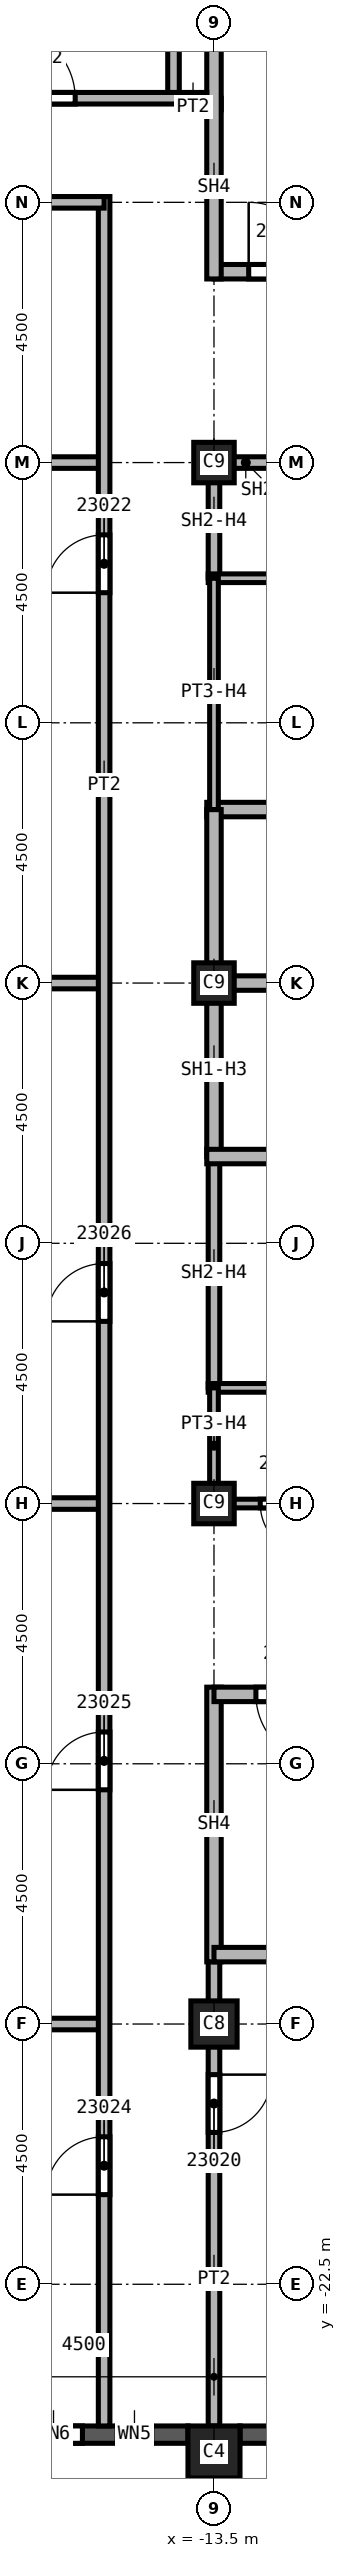
"""IFC4 building model, lengths in metres.
Left out: names, types, materials, properties, quantities, classifications, styles, units other than length and angle.
Written with IfcOpenShell. Run it as: python <this file> out.ifc"""

import sys

from ifc_helpers import new_model, si_unit, direction, frame, frame_2d, origin, origin_2d, place, context, subcontext, project, spatial, rectangle, extrude, element, fill, save


model = new_model("IFC4")
c1 = context("Model", 3, precision=1e-05, world=origin(), true_north=direction((0.0, 1.0)))
c2 = subcontext(c1, "Body", "Model", "MODEL_VIEW")
j1 = project(units=[si_unit("LENGTHUNIT", "METRE"), si_unit("PLANEANGLEUNIT", "RADIAN")], contexts=[c1])
p1 = place(None, origin())
s1 = spatial("IfcSite", under=j1, at=p1, CompositionType="ELEMENT")
p2 = place(p1, origin())
s2 = spatial("IfcBuilding", under=s1, at=p2, CompositionType="ELEMENT")
p3 = place(p2, frame((0.0, 0.0, 326.0)))
s3 = spatial("IfcBuildingStorey", under=s2, at=p3, CompositionType="ELEMENT", Elevation=326.0)
p4 = place(p3, frame((-13.5, -18.0, 0.0), z_axis=(0.0, 0.0, 1.0), x_axis=(1.0, 0.0, 0.0)))
e1 = element("IfcColumn", 1, at=p4, inside=s3, PredefinedType="COLUMN", context=c2, shape_type="SweptSolid", body=[
    extrude(rectangle(XDim=0.8, YDim=0.8, at=origin_2d()), origin(), (0.0, 0.0, 1.0), 3.74),
])
for number, where, z_axis, x_axis in (
    (2, (-13.5, 0.0, 0.0), (0.0, 0.0, 1.0), (1.0, 0.0, 0.0)),
    (3, (-13.5, 9.0, 0.0), (0.0, 0.0, 1.0), (1.0, 0.0, 0.0)),
    (4, (-13.5, -9.0, 0.0), (0.0, 0.0, 1.0), (1.0, 0.0, 0.0)),
):
    element("IfcColumn", number, at=place(p3, frame(where, z_axis=z_axis, x_axis=x_axis)), inside=s3, PredefinedType="COLUMN", context=c2, shape_type="SweptSolid", body=[
        extrude(rectangle(XDim=0.7, YDim=0.7, at=origin_2d()), origin(), (0.0, 0.0, 1.0), 3.74),
    ])
p5 = place(p3, frame((-13.5, -25.4, 0.0), z_axis=(0.0, 0.0, 1.0), x_axis=(1.0, 0.0, 0.0)))
e5 = element("IfcColumn", 5, at=p5, inside=s3, PredefinedType="COLUMN", context=c2, shape_type="SweptSolid", body=[
    extrude(rectangle(XDim=0.9, YDim=0.9, at=origin_2d()), origin(), (0.0, 0.0, 1.0), 3.74),
])
p6 = place(p3, frame((-17.55, -25.1, 0.0), z_axis=(0.0, 0.0, 1.0), x_axis=(1.0, 0.0, 0.0)))
e6 = element("IfcWall", 6, at=p6, inside=s3, PredefinedType="SOLIDWALL", context=c2, shape_type="SweptSolid", body=[
    extrude(rectangle(XDim=3.6, YDim=0.3, at=frame_2d((1.8, 0.0))), origin(), (0.0, 0.0, 1.0), 3.14),
])
p7 = place(p6, frame((0.775, 0.0, 0.8)))
e7 = element("IfcOpeningElement", 7, at=p7, cuts=e6, PredefinedType="OPENING", context=c2, shape_type="SweptSolid", body=[
    extrude(rectangle(XDim=1.0, YDim=1.95, at=frame_2d((0.5, 0.975))), frame((0.0, 0.15, 0.0), z_axis=(0.0, -1.0, 0.0), x_axis=(1.0, 0.0, 0.0)), (0.0, 0.0, 1.0), 0.3),
])
p8 = place(p6, frame((2.375, 0.0, 0.8)))
e8 = element("IfcOpeningElement", 8, at=p8, cuts=e6, PredefinedType="OPENING", context=c2, shape_type="SweptSolid", body=[
    extrude(rectangle(XDim=0.6, YDim=1.95, at=frame_2d((0.3, 0.975))), frame((0.0, 0.15, 0.0), z_axis=(0.0, -1.0, 0.0), x_axis=(1.0, 0.0, 0.0)), (0.0, 0.0, 1.0), 0.3),
])
p9 = place(p3, frame((-13.05, -25.1, 0.0), z_axis=(0.0, 0.0, 1.0), x_axis=(1.0, 0.0, 0.0)))
e9 = element("IfcWall", 9, at=p9, inside=s3, PredefinedType="SOLIDWALL", context=c2, shape_type="SweptSolid", body=[
    extrude(rectangle(XDim=3.6, YDim=0.3, at=frame_2d((1.8, 0.0))), origin(), (0.0, 0.0, 1.0), 3.14),
])
p10 = place(p9, frame((0.6, 0.0, 0.8)))
e10 = element("IfcOpeningElement", 10, at=p10, cuts=e9, PredefinedType="OPENING", context=c2, shape_type="SweptSolid", body=[
    extrude(rectangle(XDim=2.4, YDim=1.95, at=frame_2d((1.2, 0.975))), frame((0.0, 0.15, 0.0), z_axis=(0.0, -1.0, 0.0), x_axis=(1.0, 0.0, 0.0)), (0.0, 0.0, 1.0), 0.3),
])
for number, where, z_axis, x_axis in (
    (11, (-26.55, -9.0, 0.0), (0.0, 0.0, 1.0), (1.0, 0.0, 0.0)),
    (12, (-26.55, 9.0, 0.0), (0.0, 0.0, 1.0), (1.0, 0.0, 0.0)),
):
    element("IfcWall", number, at=place(p3, frame(where, z_axis=z_axis, x_axis=x_axis)), inside=s3, PredefinedType="PARTITIONING", context=c2, shape_type="SweptSolid", body=[
        extrude(rectangle(XDim=11.15, YDim=0.2, at=frame_2d((5.575, 0.0))), origin(), (0.0, 0.0, 1.0), 3.74),
    ])
p11 = place(p3, frame((-24.3, -18.0, 0.0), z_axis=(0.0, 0.0, 1.0), x_axis=(1.0, 0.0, 0.0)))
e13 = element("IfcWall", 13, at=p11, inside=s3, PredefinedType="PARTITIONING", context=c2, shape_type="SweptSolid", body=[
    extrude(rectangle(XDim=8.9, YDim=0.2, at=frame_2d((4.45, 0.0))), origin(), (0.0, 0.0, 1.0), 3.74),
])
p12 = place(p3, frame((-15.4, 0.0, 0.0), z_axis=(0.0, 0.0, 1.0), x_axis=(-1.0, 0.0, 0.0)))
e14 = element("IfcWall", 14, at=p12, inside=s3, PredefinedType="PARTITIONING", context=c2, shape_type="SweptSolid", body=[
    extrude(rectangle(XDim=11.15, YDim=0.2, at=frame_2d((5.575, 0.0))), origin(), (0.0, 0.0, 1.0), 3.74),
])
p13 = place(p3, frame((-15.4, -24.95, 0.0), z_axis=(0.0, 0.0, 1.0), x_axis=(0.0, 1.0, 0.0)))
e15 = element("IfcWall", 15, at=p13, inside=s3, PredefinedType="PARTITIONING", context=c2, shape_type="SweptSolid", body=[
    extrude(rectangle(XDim=38.55, YDim=0.2, at=frame_2d((19.275, 0.0))), origin(), (0.0, 0.0, 1.0), 3.74),
])
p14 = place(p13, frame((31.7, 0.0, 0.0)))
e16 = element("IfcOpeningElement", 16, at=p14, cuts=e15, PredefinedType="OPENING", context=c2, shape_type="SweptSolid", body=[
    extrude(rectangle(XDim=1.0, YDim=2.1, at=frame_2d((0.5, 1.05))), frame((0.0, 0.1, 0.0), z_axis=(0.0, -1.0, 0.0), x_axis=(1.0, 0.0, 0.0)), (0.0, 0.0, 1.0), 0.2),
])
p15 = place(p13, frame((4.0, 0.0, 0.0)))
e17 = element("IfcOpeningElement", 17, at=p15, cuts=e15, PredefinedType="OPENING", context=c2, shape_type="SweptSolid", body=[
    extrude(rectangle(XDim=1.0, YDim=2.1, at=frame_2d((0.5, 1.05))), frame((0.0, 0.1, 0.0), z_axis=(0.0, -1.0, 0.0), x_axis=(1.0, 0.0, 0.0)), (0.0, 0.0, 1.0), 0.2),
])
p16 = place(p13, frame((11.0, 0.0, 0.0)))
e18 = element("IfcOpeningElement", 18, at=p16, cuts=e15, PredefinedType="OPENING", context=c2, shape_type="SweptSolid", body=[
    extrude(rectangle(XDim=1.0, YDim=2.1, at=frame_2d((0.5, 1.05))), frame((0.0, 0.1, 0.0), z_axis=(0.0, -1.0, 0.0), x_axis=(1.0, 0.0, 0.0)), (0.0, 0.0, 1.0), 0.2),
])
p17 = place(p13, frame((19.1, 0.0, 0.0)))
e19 = element("IfcOpeningElement", 19, at=p17, cuts=e15, PredefinedType="OPENING", context=c2, shape_type="SweptSolid", body=[
    extrude(rectangle(XDim=1.0, YDim=2.1, at=frame_2d((0.5, 1.05))), frame((0.0, 0.1, 0.0), z_axis=(0.0, -1.0, 0.0), x_axis=(1.0, 0.0, 0.0)), (0.0, 0.0, 1.0), 0.2),
])
p18 = place(p3, frame((-15.4, 13.5, 0.0), z_axis=(0.0, 0.0, 1.0), x_axis=(-1.0, 0.0, 0.0)))
e20 = element("IfcWall", 20, at=p18, inside=s3, PredefinedType="PARTITIONING", context=c2, shape_type="SweptSolid", body=[
    extrude(rectangle(XDim=6.6, YDim=0.2, at=frame_2d((3.3, 0.0))), origin(), (0.0, 0.0, 1.0), 3.74),
])
p19 = place(p18, frame((4.6, 0.0, 0.0)))
e21 = element("IfcOpeningElement", 21, at=p19, cuts=e20, PredefinedType="OPENING", context=c2, shape_type="SweptSolid", body=[
    extrude(rectangle(XDim=1.0, YDim=2.1, at=frame_2d((0.5, 1.05))), frame((0.0, 0.1, 0.0), z_axis=(0.0, -1.0, 0.0), x_axis=(1.0, 0.0, 0.0)), (0.0, 0.0, 1.0), 0.2),
])
p20 = place(p3, frame((-14.1, 15.2, 0.0), z_axis=(0.0, 0.0, 1.0), x_axis=(1.0, 0.0, 0.0)))
e22 = element("IfcWall", 22, at=p20, inside=s3, PredefinedType="PARTITIONING", context=c2, shape_type="SweptSolid", body=[
    extrude(rectangle(XDim=0.725, YDim=0.2, at=frame_2d((0.363, 0.0))), origin(), (0.0, 0.0, 1.0), 3.74),
])
p21 = place(p3, frame((-13.5, -16.675, 0.0), z_axis=(0.0, 0.0, 1.0), x_axis=(0.0, -1.0, 0.0)))
e23 = element("IfcWall", 23, at=p21, inside=s3, PredefinedType="PARTITIONING", context=c2, shape_type="SweptSolid", body=[
    extrude(rectangle(XDim=8.275, YDim=0.2, at=frame_2d((4.137, 0.0))), origin(), (0.0, 0.0, 1.0), 3.74),
])
p22 = place(p21, frame((2.2, 0.0, 0.0)))
e24 = element("IfcOpeningElement", 24, at=p22, cuts=e23, PredefinedType="OPENING", context=c2, shape_type="SweptSolid", body=[
    extrude(rectangle(XDim=1.0, YDim=2.1, at=frame_2d((0.5, 1.05))), frame((0.0, 0.1, 0.0), z_axis=(0.0, -1.0, 0.0), x_axis=(1.0, 0.0, 0.0)), (0.0, 0.0, 1.0), 0.2),
])
p23 = place(p3, frame((-13.5, -7.0, 0.0), z_axis=(0.0, 0.0, 1.0), x_axis=(0.0, 1.0, 0.0)))
e25 = element("IfcWall", 25, at=p23, inside=s3, PredefinedType="SOLIDWALL", context=c2, shape_type="SweptSolid", body=[
    extrude(rectangle(XDim=4.0, YDim=0.2, at=frame_2d((2.0, 0.0))), origin(), (0.0, 0.0, 1.0), 3.062),
])
p24 = place(p3, frame((-13.5, 7.0, 0.0), z_axis=(0.0, 0.0, 1.0), x_axis=(0.0, 1.0, 0.0)))
e26 = element("IfcWall", 26, at=p24, inside=s3, PredefinedType="SOLIDWALL", context=c2, shape_type="SweptSolid", body=[
    extrude(rectangle(XDim=2.1, YDim=0.2, at=frame_2d((1.05, 0.0))), origin(), (0.0, 0.0, 1.0), 3.062),
])
p25 = place(p3, frame((-13.5, 9.0, 0.0), z_axis=(0.0, 0.0, 1.0), x_axis=(1.0, 0.0, 0.0)))
e27 = element("IfcWall", 27, at=p25, inside=s3, PredefinedType="SOLIDWALL", context=c2, shape_type="SweptSolid", body=[
    extrude(rectangle(XDim=3.0, YDim=0.2, at=frame_2d((1.5, 0.0))), origin(), (0.0, 0.0, 1.0), 3.062),
])
p26 = place(p25, frame((1.0, 0.0, 0.0)))
e28 = element("IfcOpeningElement", 28, at=p26, cuts=e27, PredefinedType="OPENING", context=c2, shape_type="SweptSolid", body=[
    extrude(rectangle(XDim=1.1, YDim=2.1, at=frame_2d((0.55, 1.05))), frame((0.0, 0.1, 0.0), z_axis=(0.0, -1.0, 0.0), x_axis=(1.0, 0.0, 0.0)), (0.0, 0.0, 1.0), 0.2),
])
p27 = place(p3, frame((-13.625, 0.0, 0.0), z_axis=(0.0, 0.0, 1.0), x_axis=(1.0, 0.0, 0.0)))
e29 = element("IfcWall", 29, at=p27, inside=s3, PredefinedType="SOLIDWALL", context=c2, shape_type="SweptSolid", body=[
    extrude(rectangle(XDim=3.125, YDim=0.25, at=frame_2d((1.562, 0.0))), origin(), (0.0, 0.0, 1.0), 3.74),
])
p28 = place(p3, frame((-13.625, 3.0, 0.0), z_axis=(0.0, 0.0, 1.0), x_axis=(1.0, 0.0, 0.0)))
e30 = element("IfcWall", 30, at=p28, inside=s3, PredefinedType="SOLIDWALL", context=c2, shape_type="SweptSolid", body=[
    extrude(rectangle(XDim=6.125, YDim=0.25, at=frame_2d((3.062, 0.0))), origin(), (0.0, 0.0, 1.0), 3.74),
])
p29 = place(p28, frame((4.0, 0.0, 0.0)))
e31 = element("IfcOpeningElement", 31, at=p29, cuts=e30, PredefinedType="OPENING", context=c2, shape_type="SweptSolid", body=[
    extrude(rectangle(XDim=1.1, YDim=2.1, at=frame_2d((0.55, 1.05))), frame((0.0, 0.125, 0.0), z_axis=(0.0, -1.0, 0.0), x_axis=(1.0, 0.0, 0.0)), (0.0, 0.0, 1.0), 0.25),
])
p30 = place(p3, frame((-13.5, -3.0, 0.0), z_axis=(0.0, 0.0, 1.0), x_axis=(0.0, 1.0, 0.0)))
e32 = element("IfcWall", 32, at=p30, inside=s3, PredefinedType="SOLIDWALL", context=c2, shape_type="SweptSolid", body=[
    extrude(rectangle(XDim=6.0, YDim=0.25, at=frame_2d((3.0, 0.0))), origin(), (0.0, 0.0, 1.0), 3.062),
])
p31 = place(p3, frame((-13.625, -3.0, 0.0), z_axis=(0.0, 0.0, 1.0), x_axis=(1.0, 0.0, 0.0)))
e33 = element("IfcWall", 33, at=p31, inside=s3, PredefinedType="SOLIDWALL", context=c2, shape_type="SweptSolid", body=[
    extrude(rectangle(XDim=6.125, YDim=0.25, at=frame_2d((3.062, 0.0))), origin(), (0.0, 0.0, 1.0), 3.74),
])
p32 = place(p31, frame((4.0, 0.0, 0.0)))
e34 = element("IfcOpeningElement", 34, at=p32, cuts=e33, PredefinedType="OPENING", context=c2, shape_type="SweptSolid", body=[
    extrude(rectangle(XDim=1.1, YDim=2.1, at=frame_2d((0.55, 1.05))), frame((0.0, 0.125, 0.0), z_axis=(0.0, -1.0, 0.0), x_axis=(1.0, 0.0, 0.0)), (0.0, 0.0, 1.0), 0.25),
])
p33 = place(p3, frame((-13.5, -12.175, 0.0), z_axis=(0.0, 0.0, 1.0), x_axis=(0.0, -1.0, 0.0)))
e35 = element("IfcWall", 35, at=p33, inside=s3, PredefinedType="SOLIDWALL", context=c2, shape_type="SweptSolid", body=[
    extrude(rectangle(XDim=4.75, YDim=0.25, at=frame_2d((2.375, 0.0))), origin(), (0.0, 0.0, 1.0), 3.74),
])
p34 = place(p3, frame((-13.5, 12.3, 0.0), z_axis=(0.0, 0.0, 1.0), x_axis=(1.0, 0.0, 0.0)))
e36 = element("IfcWall", 36, at=p34, inside=s3, PredefinedType="SOLIDWALL", context=c2, shape_type="SweptSolid", body=[
    extrude(rectangle(XDim=9.125, YDim=0.25, at=frame_2d((4.562, 0.0))), origin(), (0.0, 0.0, 1.0), 3.74),
])
p35 = place(p34, frame((0.6, 0.0, 0.0)))
e37 = element("IfcOpeningElement", 37, at=p35, cuts=e36, PredefinedType="OPENING", context=c2, shape_type="SweptSolid", body=[
    extrude(rectangle(XDim=1.2, YDim=2.1, at=frame_2d((0.6, 1.05))), frame((0.0, 0.125, 0.0), z_axis=(0.0, -1.0, 0.0), x_axis=(1.0, 0.0, 0.0)), (0.0, 0.0, 1.0), 0.25),
])
p36 = place(p3, frame((-13.5, 12.175, 0.0), z_axis=(0.0, 0.0, 1.0), x_axis=(0.0, 1.0, 0.0)))
e38 = element("IfcWall", 38, at=p36, inside=s3, PredefinedType="SOLIDWALL", context=c2, shape_type="SweptSolid", body=[
    extrude(rectangle(XDim=4.75, YDim=0.25, at=frame_2d((2.375, 0.0))), origin(), (0.0, 0.0, 1.0), 3.74),
])
p37 = place(p3, frame((-4.5, -16.8, 0.0), z_axis=(0.0, 0.0, 1.0), x_axis=(-1.0, 0.0, 0.0)))
e39 = element("IfcWall", 39, at=p37, inside=s3, PredefinedType="SOLIDWALL", context=c2, shape_type="SweptSolid", body=[
    extrude(rectangle(XDim=9.0, YDim=0.25, at=frame_2d((4.5, 0.0))), origin(), (0.0, 0.0, 1.0), 3.74),
])
p38 = place(p3, frame((-4.375, -12.3, 0.0), z_axis=(0.0, 0.0, 1.0), x_axis=(-1.0, 0.0, 0.0)))
e40 = element("IfcWall", 40, at=p38, inside=s3, PredefinedType="SOLIDWALL", context=c2, shape_type="SweptSolid", body=[
    extrude(rectangle(XDim=9.125, YDim=0.25, at=frame_2d((4.562, 0.0))), origin(), (0.0, 0.0, 1.0), 3.74),
])
p39 = place(p38, frame((7.2, 0.0, 0.0)))
e41 = element("IfcOpeningElement", 41, at=p39, cuts=e40, PredefinedType="OPENING", context=c2, shape_type="SweptSolid", body=[
    extrude(rectangle(XDim=1.2, YDim=2.1, at=frame_2d((0.6, 1.05))), frame((0.0, 0.125, 0.0), z_axis=(0.0, -1.0, 0.0), x_axis=(1.0, 0.0, 0.0)), (0.0, 0.0, 1.0), 0.25),
])
for number, where, z_axis, x_axis in (
    (42, (-13.6, -7.0, 0.0), (0.0, 0.0, 1.0), (1.0, 0.0, 0.0)),
    (43, (-13.6, 7.0, 0.0), (0.0, 0.0, 1.0), (1.0, 0.0, 0.0)),
):
    element("IfcWall", number, at=place(p3, frame(where, z_axis=z_axis, x_axis=x_axis)), inside=s3, PredefinedType="PARTITIONING", context=c2, shape_type="SweptSolid", body=[
        extrude(rectangle(XDim=3.1, YDim=0.15, at=frame_2d((1.55, 0.0))), origin(), (0.0, 0.0, 1.0), 3.74),
    ])
p40 = place(p3, frame((-13.5, -9.075, 0.0), z_axis=(0.0, 0.0, 1.0), x_axis=(0.0, 1.0, 0.0)))
e44 = element("IfcWall", 44, at=p40, inside=s3, PredefinedType="PARTITIONING", context=c2, shape_type="SweptSolid", body=[
    extrude(rectangle(XDim=2.075, YDim=0.15, at=frame_2d((1.038, 0.0))), origin(), (0.0, 0.0, 1.0), 3.062),
])
p41 = place(p3, frame((-13.5, 3.0, 0.0), z_axis=(0.0, 0.0, 1.0), x_axis=(0.0, 1.0, 0.0)))
e45 = element("IfcWall", 45, at=p41, inside=s3, PredefinedType="PARTITIONING", context=c2, shape_type="SweptSolid", body=[
    extrude(rectangle(XDim=4.0, YDim=0.15, at=frame_2d((2.0, 0.0))), origin(), (0.0, 0.0, 1.0), 3.062),
])
p42 = place(p3, frame((-10.5, -9.0, 0.0), z_axis=(0.0, 0.0, 1.0), x_axis=(-1.0, 0.0, 0.0)))
e46 = element("IfcWall", 46, at=p42, inside=s3, PredefinedType="PARTITIONING", context=c2, shape_type="SweptSolid", body=[
    extrude(rectangle(XDim=3.0, YDim=0.15, at=frame_2d((1.5, 0.0))), origin(), (0.0, 0.0, 1.0), 3.062),
])
p43 = place(p42, frame((1.3, 0.0, 0.0)))
e47 = element("IfcOpeningElement", 47, at=p43, cuts=e46, PredefinedType="OPENING", context=c2, shape_type="SweptSolid", body=[
    extrude(rectangle(XDim=0.9, YDim=2.1, at=frame_2d((0.45, 1.05))), frame((0.0, 0.075, 0.0), z_axis=(0.0, -1.0, 0.0), x_axis=(1.0, 0.0, 0.0)), (0.0, 0.0, 1.0), 0.15),
])
p44 = place(p3, frame((-21.9, 15.3, 0.0), z_axis=(0.0, 0.0, 1.0), x_axis=(1.0, 0.0, 0.0)))
e48 = element("IfcWall", 48, at=p44, inside=s3, PredefinedType="SOLIDWALL", context=c2, shape_type="SweptSolid", body=[
    extrude(rectangle(XDim=8.275, YDim=0.2, at=frame_2d((4.137, 0.0))), origin(), (0.0, 0.0, 1.0), 3.74),
])
p45 = place(p44, frame((4.8, 0.0, 0.0)))
e49 = element("IfcOpeningElement", 49, at=p45, cuts=e48, PredefinedType="OPENING", context=c2, shape_type="SweptSolid", body=[
    extrude(rectangle(XDim=1.2, YDim=2.1, at=frame_2d((0.6, 1.05))), frame((0.0, 0.1, 0.0), z_axis=(0.0, -1.0, 0.0), x_axis=(1.0, 0.0, 0.0)), (0.0, 0.0, 1.0), 0.2),
])
p46 = place(p3, frame((-14.2, 15.4, 0.0), z_axis=(0.0, 0.0, 1.0), x_axis=(0.0, 1.0, 0.0)))
e50 = element("IfcWall", 50, at=p46, inside=s3, PredefinedType="SOLIDWALL", context=c2, shape_type="SweptSolid", body=[
    extrude(rectangle(XDim=5.9, YDim=0.2, at=frame_2d((2.95, 0.0))), origin(), (0.0, 0.0, 1.0), 3.74),
])
p47 = place(p43, origin())
e51 = element("IfcDoor", 51, at=p47, inside=s3, OperationType="SINGLE_SWING_RIGHT", PredefinedType="DOOR", context=c2, shape_type="SweptSolid", body=[
    extrude(rectangle(XDim=0.9, YDim=2.1, at=frame_2d((0.45, 1.05))), frame((0.0, 0.025, 0.0), z_axis=(0.0, -1.0, 0.0), x_axis=(1.0, 0.0, 0.0)), (0.0, 0.0, 1.0), 0.05),
])
fill(e47, e51)
p48 = place(p35, origin())
e52 = element("IfcDoor", 52, at=p48, inside=s3, OperationType="SINGLE_SWING_RIGHT", PredefinedType="DOOR", context=c2, shape_type="SweptSolid", body=[
    extrude(rectangle(XDim=1.2, YDim=2.1, at=frame_2d((0.6, 1.05))), frame((0.0, 0.025, 0.0), z_axis=(0.0, -1.0, 0.0), x_axis=(1.0, 0.0, 0.0)), (0.0, 0.0, 1.0), 0.05),
])
fill(e37, e52)
p49 = place(p39, origin())
e53 = element("IfcDoor", 53, at=p49, inside=s3, OperationType="SINGLE_SWING_LEFT", PredefinedType="DOOR", context=c2, shape_type="SweptSolid", body=[
    extrude(rectangle(XDim=1.2, YDim=2.1, at=frame_2d((0.6, 1.05))), frame((0.0, 0.025, 0.0), z_axis=(0.0, -1.0, 0.0), x_axis=(1.0, 0.0, 0.0)), (0.0, 0.0, 1.0), 0.05),
])
fill(e41, e53)
p50 = place(p22, origin())
e54 = element("IfcDoor", 54, at=p50, inside=s3, OperationType="SINGLE_SWING_LEFT", PredefinedType="DOOR", context=c2, shape_type="SweptSolid", body=[
    extrude(rectangle(XDim=1.0, YDim=2.1, at=frame_2d((0.5, 1.05))), frame((0.0, 0.025, 0.0), z_axis=(0.0, -1.0, 0.0), x_axis=(1.0, 0.0, 0.0)), (0.0, 0.0, 1.0), 0.05),
])
fill(e24, e54)
p51 = place(p14, origin())
e55 = element("IfcDoor", 55, at=p51, inside=s3, OperationType="SINGLE_SWING_LEFT", PredefinedType="DOOR", context=c2, shape_type="SweptSolid", body=[
    extrude(rectangle(XDim=1.0, YDim=2.1, at=frame_2d((0.5, 1.05))), frame((0.0, 0.025, 0.0), z_axis=(0.0, -1.0, 0.0), x_axis=(1.0, 0.0, 0.0)), (0.0, 0.0, 1.0), 0.05),
])
fill(e16, e55)
p52 = place(p15, origin())
e56 = element("IfcDoor", 56, at=p52, inside=s3, OperationType="SINGLE_SWING_LEFT", PredefinedType="DOOR", context=c2, shape_type="SweptSolid", body=[
    extrude(rectangle(XDim=1.0, YDim=2.1, at=frame_2d((0.5, 1.05))), frame((0.0, 0.025, 0.0), z_axis=(0.0, -1.0, 0.0), x_axis=(1.0, 0.0, 0.0)), (0.0, 0.0, 1.0), 0.05),
])
fill(e17, e56)
p53 = place(p16, origin())
e57 = element("IfcDoor", 57, at=p53, inside=s3, OperationType="SINGLE_SWING_RIGHT", PredefinedType="DOOR", context=c2, shape_type="SweptSolid", body=[
    extrude(rectangle(XDim=1.0, YDim=2.1, at=frame_2d((0.5, 1.05))), frame((0.0, 0.025, 0.0), z_axis=(0.0, -1.0, 0.0), x_axis=(1.0, 0.0, 0.0)), (0.0, 0.0, 1.0), 0.05),
])
fill(e18, e57)
p54 = place(p17, origin())
e58 = element("IfcDoor", 58, at=p54, inside=s3, OperationType="SINGLE_SWING_LEFT", PredefinedType="DOOR", context=c2, shape_type="SweptSolid", body=[
    extrude(rectangle(XDim=1.0, YDim=2.1, at=frame_2d((0.5, 1.05))), frame((0.0, 0.025, 0.0), z_axis=(0.0, -1.0, 0.0), x_axis=(1.0, 0.0, 0.0)), (0.0, 0.0, 1.0), 0.05),
])
fill(e19, e58)
p55 = place(p45, origin())
e59 = element("IfcDoor", 59, at=p55, inside=s3, OperationType="SINGLE_SWING_RIGHT", PredefinedType="DOOR", context=c2, shape_type="SweptSolid", body=[
    extrude(rectangle(XDim=1.2, YDim=2.1, at=frame_2d((0.6, 1.05))), frame((0.0, 0.025, 0.0), z_axis=(0.0, -1.0, 0.0), x_axis=(1.0, 0.0, 0.0)), (0.0, 0.0, 1.0), 0.05),
])
fill(e49, e59)
p56 = place(p7, origin())
e60 = element("IfcWindow", 60, at=p56, inside=s3, PartitioningType="SINGLE_PANEL", PredefinedType="WINDOW", context=c2, shape_type="SweptSolid", body=[
    extrude(rectangle(XDim=1.0, YDim=1.95, at=frame_2d((0.5, 0.975))), frame((0.0, 0.03, 0.0), z_axis=(0.0, -1.0, 0.0), x_axis=(1.0, 0.0, 0.0)), (0.0, 0.0, 1.0), 0.06),
])
fill(e7, e60)
p57 = place(p8, origin())
e61 = element("IfcWindow", 61, at=p57, inside=s3, PartitioningType="SINGLE_PANEL", PredefinedType="WINDOW", context=c2, shape_type="SweptSolid", body=[
    extrude(rectangle(XDim=0.6, YDim=1.95, at=frame_2d((0.3, 0.975))), frame((0.0, 0.03, 0.0), z_axis=(0.0, -1.0, 0.0), x_axis=(1.0, 0.0, 0.0)), (0.0, 0.0, 1.0), 0.06),
])
fill(e8, e61)
save(model, sys.argv[1])
